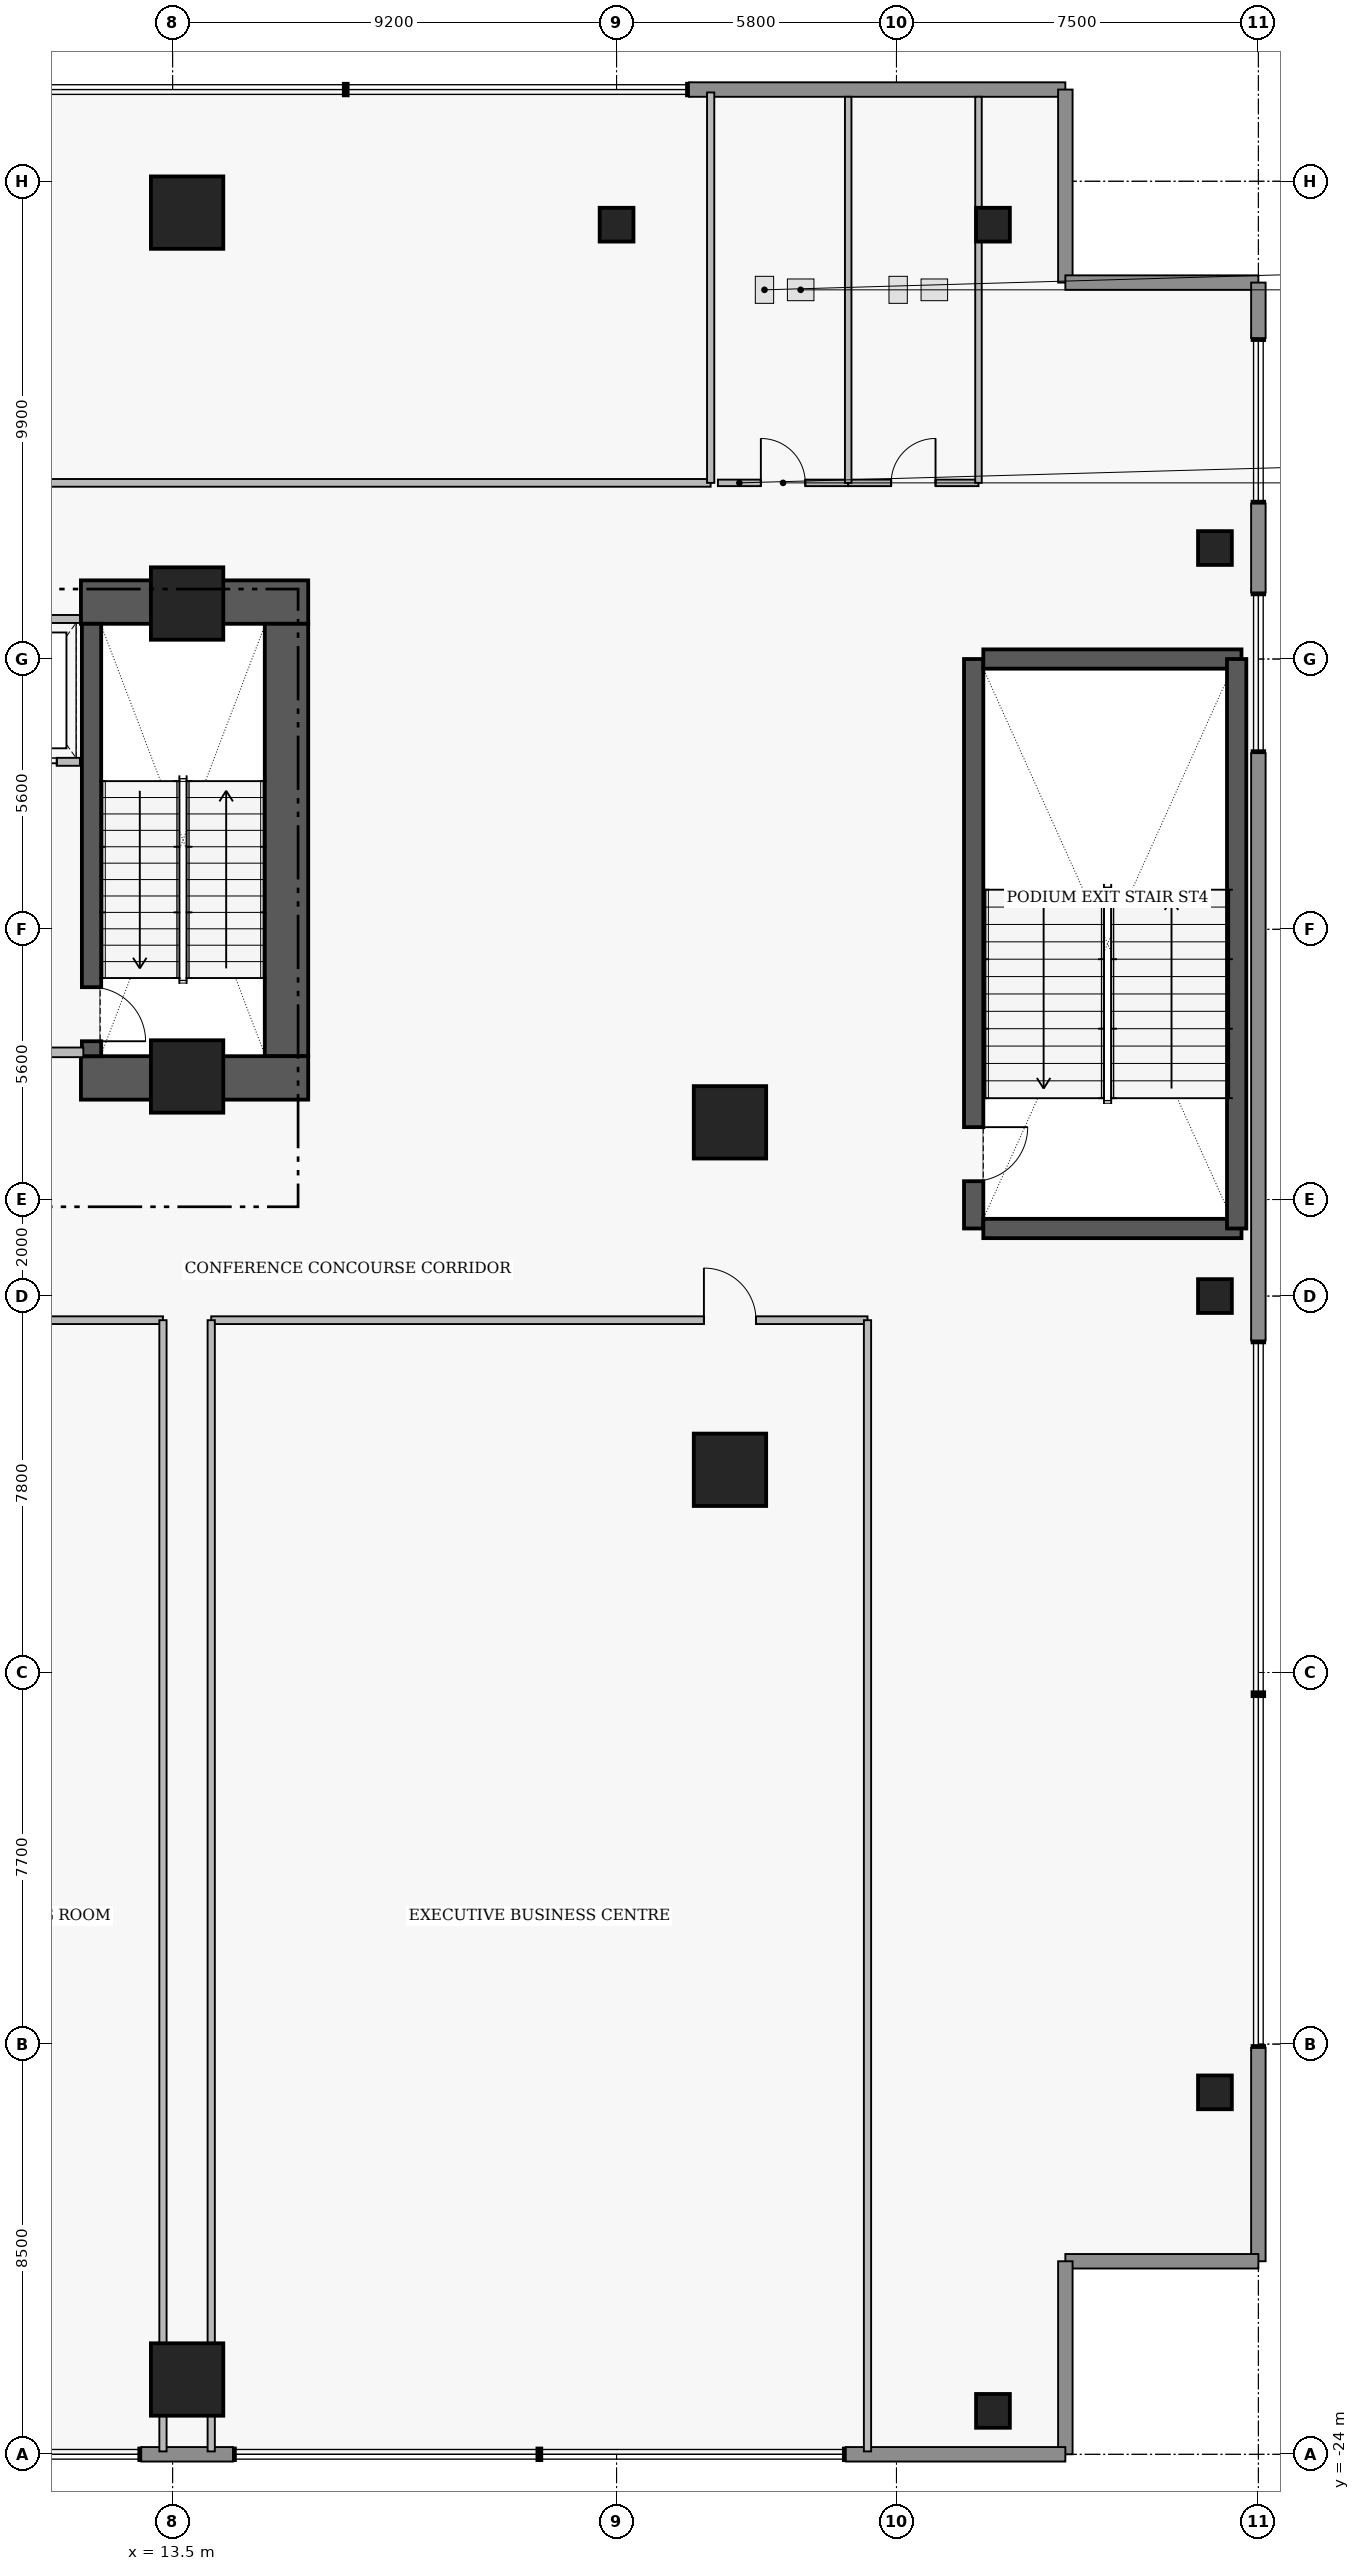
"""IFC4 building model, lengths in metres.
Left out: names, types, materials, properties, quantities, classifications, styles, units other than length and angle.
Written with IfcOpenShell. Run it as: python <this file> out.ifc"""

import sys

from ifc_helpers import new_model, si_unit, direction, frame, frame_2d, origin, origin_2d, place, context, subcontext, project, spatial, rectangle, extrude, element, fill, save


model = new_model("IFC4")
c1 = context("Model", 3, precision=1e-05, world=origin(), true_north=direction((0.0, 1.0)))
c2 = subcontext(c1, "Body", "Model", "MODEL_VIEW")
j1 = project(units=[si_unit("LENGTHUNIT", "METRE"), si_unit("PLANEANGLEUNIT", "RADIAN")], contexts=[c1])
p1 = place(None, origin())
s1 = spatial("IfcSite", under=j1, at=p1, CompositionType="ELEMENT")
p2 = place(p1, origin())
s2 = spatial("IfcBuilding", under=s1, at=p2, CompositionType="ELEMENT")
p3 = place(p2, frame((0.0, 0.0, 18.0)))
s3 = spatial("IfcBuildingStorey", under=s2, at=p3, CompositionType="ELEMENT", Elevation=18.0)
p4 = place(p3, frame((11.6, 14.38, 0.0), z_axis=(0.0, 0.0, 1.0), x_axis=(1.0, 0.0, 0.0)))
e1 = element("IfcWall", 1, at=p4, inside=s3, PredefinedType="SHEAR", context=c2, shape_type="SweptSolid", body=[
    extrude(rectangle(XDim=4.71, YDim=0.9, at=frame_2d((2.355, 0.0))), origin(), (0.0, 0.0, 1.0), 4.61),
])
p5 = place(p3, frame((15.86, 4.97, 0.0), z_axis=(0.0, 0.0, 1.0), x_axis=(0.0, 1.0, 0.0)))
e2 = element("IfcWall", 2, at=p5, inside=s3, PredefinedType="SHEAR", context=c2, shape_type="SweptSolid", body=[
    extrude(rectangle(XDim=8.96, YDim=0.9, at=frame_2d((4.48, 0.0))), origin(), (0.0, 0.0, 1.0), 4.61),
])
p6 = place(p3, frame((11.6, 4.52, 0.0), z_axis=(0.0, 0.0, 1.0), x_axis=(1.0, 0.0, 0.0)))
e3 = element("IfcWall", 3, at=p6, inside=s3, PredefinedType="SHEAR", context=c2, shape_type="SweptSolid", body=[
    extrude(rectangle(XDim=4.71, YDim=0.9, at=frame_2d((2.355, 0.0))), origin(), (0.0, 0.0, 1.0), 4.61),
])
p7 = place(p3, frame((11.82, 13.93, 0.0), z_axis=(0.0, 0.0, 1.0), x_axis=(0.0, -1.0, 0.0)))
e4 = element("IfcWall", 4, at=p7, inside=s3, PredefinedType="SHEAR", context=c2, shape_type="SweptSolid", body=[
    extrude(rectangle(XDim=8.96, YDim=0.4, at=frame_2d((4.48, 0.0))), origin(), (0.0, 0.0, 1.0), 4.61),
])
p8 = place(p7, frame((7.53, 0.0, 0.0)))
e5 = element("IfcOpeningElement", 5, at=p8, cuts=e4, PredefinedType="OPENING", context=c2, shape_type="SweptSolid", body=[
    extrude(rectangle(XDim=1.12, YDim=2.22, at=frame_2d((0.56, 1.11))), frame((0.0, 0.21, 0.0), z_axis=(0.0, -1.0, 0.0), x_axis=(1.0, 0.0, 0.0)), (0.0, 0.0, 1.0), 0.42),
])
p9 = place(p3, frame((30.1, 13.2, 0.0), z_axis=(0.0, 0.0, 1.0), x_axis=(0.0, -1.0, 0.0)))
e6 = element("IfcWall", 6, at=p9, inside=s3, PredefinedType="SHEAR", context=c2, shape_type="SweptSolid", body=[
    extrude(rectangle(XDim=11.8, YDim=0.4, at=frame_2d((5.9, 0.0))), origin(), (0.0, 0.0, 1.0), 4.61),
])
p10 = place(p9, frame((9.7, 0.0, 0.0)))
e7 = element("IfcOpeningElement", 7, at=p10, cuts=e6, PredefinedType="OPENING", context=c2, shape_type="SweptSolid", body=[
    extrude(rectangle(XDim=1.12, YDim=2.22, at=frame_2d((0.56, 1.11))), frame((0.0, 0.21, 0.0), z_axis=(0.0, -1.0, 0.0), x_axis=(1.0, 0.0, 0.0)), (0.0, 0.0, 1.0), 0.42),
])
for number, where, z_axis, x_axis in (
    (8, (30.3, 1.4, 0.0), (0.0, 0.0, 1.0), (1.0, 0.0, 0.0)),
    (9, (30.3, 13.2, 0.0), (0.0, 0.0, 1.0), (1.0, 0.0, 0.0)),
):
    element("IfcWall", number, at=place(p3, frame(where, z_axis=z_axis, x_axis=x_axis)), inside=s3, PredefinedType="SHEAR", context=c2, shape_type="SweptSolid", body=[
        extrude(rectangle(XDim=5.35, YDim=0.4, at=frame_2d((2.675, 0.0))), origin(), (0.0, 0.0, 1.0), 4.61),
    ])
p11 = place(p3, frame((35.55, 1.4, 0.0), z_axis=(0.0, 0.0, 1.0), x_axis=(0.0, 1.0, 0.0)))
e10 = element("IfcWall", 10, at=p11, inside=s3, PredefinedType="SHEAR", context=c2, shape_type="SweptSolid", body=[
    extrude(rectangle(XDim=11.8, YDim=0.4, at=frame_2d((5.9, 0.0))), origin(), (0.0, 0.0, 1.0), 4.61),
])
for number, where, z_axis, x_axis in (
    (11, (13.8, 14.35, 0.0), (0.0, 0.0, 1.0), (1.0, 0.0, 0.0)),
    (12, (13.8, 4.55, 0.0), (0.0, 0.0, 1.0), (1.0, 0.0, 0.0)),
    (13, (13.8, -22.45, 0.0), (0.0, 0.0, 1.0), (1.0, 0.0, 0.0)),
    (14, (13.8, 22.45, 0.0), (0.0, 0.0, 1.0), (1.0, 0.0, 0.0)),
    (15, (25.05, -3.6, 0.0), (0.0, 0.0, 1.0), (1.0, 0.0, 0.0)),
    (16, (25.05, 3.6, 0.0), (0.0, 0.0, 1.0), (1.0, 0.0, 0.0)),
):
    element("IfcColumn", number, at=place(p3, frame(where, z_axis=z_axis, x_axis=x_axis)), inside=s3, PredefinedType="COLUMN", context=c2, shape_type="SweptSolid", body=[
        extrude(rectangle(XDim=1.5, YDim=1.5, at=origin_2d()), origin(), (0.0, 0.0, 1.0), 4.8),
    ])
for number, where, z_axis, x_axis in (
    (17, (30.5, -23.1, 0.0), (0.0, 0.0, 1.0), (1.0, 0.0, 0.0)),
    (18, (30.5, 22.2, 0.0), (0.0, 0.0, 1.0), (1.0, 0.0, 0.0)),
    (19, (35.1, -16.5, 0.0), (0.0, 0.0, 1.0), (1.0, 0.0, 0.0)),
    (20, (35.1, 0.0, 0.0), (0.0, 0.0, 1.0), (1.0, 0.0, 0.0)),
    (21, (35.1, 15.5, 0.0), (0.0, 0.0, 1.0), (1.0, 0.0, 0.0)),
    (22, (22.7, 22.2, 0.0), (0.0, 0.0, 1.0), (1.0, 0.0, 0.0)),
):
    element("IfcColumn", number, at=place(p3, frame(where, z_axis=z_axis, x_axis=x_axis)), inside=s3, PredefinedType="COLUMN", context=c2, shape_type="SweptSolid", body=[
        extrude(rectangle(XDim=0.7, YDim=0.7, at=origin_2d()), origin(), (0.0, 0.0, 1.0), 4.8),
    ])
p12 = place(p3, frame((24.2, 25.0, 0.0), z_axis=(0.0, 0.0, 1.0), x_axis=(1.0, 0.0, 0.0)))
e23 = element("IfcWall", 23, at=p12, inside=s3, PredefinedType="STANDARD", context=c2, shape_type="SweptSolid", body=[
    extrude(rectangle(XDim=7.8, YDim=0.3, at=frame_2d((3.9, 0.0))), origin(), (0.0, 0.0, 1.0), 4.54),
])
for number, where, z_axis, x_axis in (
    (24, (32.0, 25.0, 0.0), (0.0, 0.0, 1.0), (0.0, -1.0, 0.0)),
    (25, (32.0, 21.0, 0.0), (0.0, 0.0, 1.0), (1.0, 0.0, 0.0)),
):
    element("IfcWall", number, at=place(p3, frame(where, z_axis=z_axis, x_axis=x_axis)), inside=s3, PredefinedType="STANDARD", context=c2, shape_type="SweptSolid", body=[
        extrude(rectangle(XDim=4.0, YDim=0.3, at=frame_2d((2.0, 0.0))), origin(), (0.0, 0.0, 1.0), 4.54),
    ])
p13 = place(p3, frame((36.0, 21.0, 0.0), z_axis=(0.0, 0.0, 1.0), x_axis=(0.0, -1.0, 0.0)))
e26 = element("IfcWall", 26, at=p13, inside=s3, PredefinedType="STANDARD", context=c2, shape_type="SweptSolid", body=[
    extrude(rectangle(XDim=1.15, YDim=0.3, at=frame_2d((0.575, 0.0))), origin(), (0.0, 0.0, 1.0), 4.54),
])
p14 = place(p3, frame((36.0, 16.42, 0.0), z_axis=(0.0, 0.0, 1.0), x_axis=(0.0, -1.0, 0.0)))
e27 = element("IfcWall", 27, at=p14, inside=s3, PredefinedType="STANDARD", context=c2, shape_type="SweptSolid", body=[
    extrude(rectangle(XDim=1.84, YDim=0.3, at=frame_2d((0.92, 0.0))), origin(), (0.0, 0.0, 1.0), 4.54),
])
p15 = place(p3, frame((36.0, 11.25, 0.0), z_axis=(0.0, 0.0, 1.0), x_axis=(0.0, -1.0, 0.0)))
e28 = element("IfcWall", 28, at=p15, inside=s3, PredefinedType="STANDARD", context=c2, shape_type="SweptSolid", body=[
    extrude(rectangle(XDim=12.17, YDim=0.3, at=frame_2d((6.085, 0.0))), origin(), (0.0, 0.0, 1.0), 4.54),
])
p16 = place(p3, frame((36.0, -15.58, 0.0), z_axis=(0.0, 0.0, 1.0), x_axis=(0.0, -1.0, 0.0)))
e29 = element("IfcWall", 29, at=p16, inside=s3, PredefinedType="STANDARD", context=c2, shape_type="SweptSolid", body=[
    extrude(rectangle(XDim=4.42, YDim=0.3, at=frame_2d((2.21, 0.0))), origin(), (0.0, 0.0, 1.0), 4.54),
])
for number, where, z_axis, x_axis in (
    (30, (36.0, -20.0, 0.0), (0.0, 0.0, 1.0), (-1.0, 0.0, 0.0)),
    (31, (32.0, -20.0, 0.0), (0.0, 0.0, 1.0), (0.0, -1.0, 0.0)),
):
    element("IfcWall", number, at=place(p3, frame(where, z_axis=z_axis, x_axis=x_axis)), inside=s3, PredefinedType="STANDARD", context=c2, shape_type="SweptSolid", body=[
        extrude(rectangle(XDim=4.0, YDim=0.3, at=frame_2d((2.0, 0.0))), origin(), (0.0, 0.0, 1.0), 4.54),
    ])
p17 = place(p3, frame((32.0, -24.0, 0.0), z_axis=(0.0, 0.0, 1.0), x_axis=(-1.0, 0.0, 0.0)))
e32 = element("IfcWall", 32, at=p17, inside=s3, PredefinedType="STANDARD", context=c2, shape_type="SweptSolid", body=[
    extrude(rectangle(XDim=4.55, YDim=0.3, at=frame_2d((2.275, 0.0))), origin(), (0.0, 0.0, 1.0), 4.54),
])
p18 = place(p3, frame((14.75, -24.0, 0.0), z_axis=(0.0, 0.0, 1.0), x_axis=(-1.0, 0.0, 0.0)))
e33 = element("IfcWall", 33, at=p18, inside=s3, PredefinedType="STANDARD", context=c2, shape_type="SweptSolid", body=[
    extrude(rectangle(XDim=1.9, YDim=0.3, at=frame_2d((0.95, 0.0))), origin(), (0.0, 0.0, 1.0), 4.54),
])
p19 = place(p3, frame((9.42, 11.07, 0.0), z_axis=(0.0, 0.0, 1.0), x_axis=(1.0, 0.0, 0.0)))
e34 = element("IfcWall", 34, at=p19, inside=s3, PredefinedType="PARTITIONING", context=c2, shape_type="SweptSolid", body=[
    extrude(rectangle(XDim=2.16, YDim=0.165, at=frame_2d((1.08, 0.0))), origin(), (0.0, 0.0, 1.0), 4.54),
])
p20 = place(p19, frame((0.53, 0.0, 0.0)))
e35 = element("IfcOpeningElement", 35, at=p20, cuts=e34, PredefinedType="OPENING", context=c2, shape_type="SweptSolid", body=[
    extrude(rectangle(XDim=1.15, YDim=2.25, at=frame_2d((0.575, 1.125))), frame((0.0, 0.093, 0.0), z_axis=(0.0, -1.0, 0.0), x_axis=(1.0, 0.0, 0.0)), (0.0, 0.0, 1.0), 0.185),
])
p21 = place(p3, frame((5.1, -0.5, 0.0), z_axis=(0.0, 0.0, 1.0), x_axis=(1.0, 0.0, 0.0)))
e36 = element("IfcWall", 36, at=p21, inside=s3, PredefinedType="PARTITIONING", context=c2, shape_type="SweptSolid", body=[
    extrude(rectangle(XDim=8.2, YDim=0.16, at=frame_2d((4.1, 0.0))), origin(), (0.0, 0.0, 1.0), 4.54),
])
p22 = place(p21, frame((3.56, 0.0, 0.0)))
e37 = element("IfcOpeningElement", 37, at=p22, cuts=e36, PredefinedType="OPENING", context=c2, shape_type="SweptSolid", body=[
    extrude(rectangle(XDim=1.08, YDim=2.18, at=frame_2d((0.54, 1.09))), frame((0.0, 0.09, 0.0), z_axis=(0.0, -1.0, 0.0), x_axis=(1.0, 0.0, 0.0)), (0.0, 0.0, 1.0), 0.18),
])
p23 = place(p3, frame((14.3, -0.5, 0.0), z_axis=(0.0, 0.0, 1.0), x_axis=(1.0, 0.0, 0.0)))
e38 = element("IfcWall", 38, at=p23, inside=s3, PredefinedType="PARTITIONING", context=c2, shape_type="SweptSolid", body=[
    extrude(rectangle(XDim=13.6, YDim=0.16, at=frame_2d((6.8, 0.0))), origin(), (0.0, 0.0, 1.0), 4.54),
])
p24 = place(p23, frame((10.21, 0.0, 0.0)))
e39 = element("IfcOpeningElement", 39, at=p24, cuts=e38, PredefinedType="OPENING", context=c2, shape_type="SweptSolid", body=[
    extrude(rectangle(XDim=1.08, YDim=2.18, at=frame_2d((0.54, 1.09))), frame((0.0, 0.09, 0.0), z_axis=(0.0, -1.0, 0.0), x_axis=(1.0, 0.0, 0.0)), (0.0, 0.0, 1.0), 0.18),
])
p25 = place(p3, frame((-27.9, 16.85, 0.0), z_axis=(0.0, 0.0, 1.0), x_axis=(1.0, 0.0, 0.0)))
e40 = element("IfcWall", 40, at=p25, inside=s3, PredefinedType="PARTITIONING", context=c2, shape_type="SweptSolid", body=[
    extrude(rectangle(XDim=52.55, YDim=0.16, at=frame_2d((26.275, 0.0))), origin(), (0.0, 0.0, 1.0), 4.007),
])
p26 = place(p25, frame((25.735, 0.0, 0.0)))
e41 = element("IfcOpeningElement", 41, at=p26, cuts=e40, PredefinedType="OPENING", context=c2, shape_type="SweptSolid", body=[
    extrude(rectangle(XDim=1.08, YDim=2.18, at=frame_2d((0.54, 1.09))), frame((0.0, 0.09, 0.0), z_axis=(0.0, -1.0, 0.0), x_axis=(1.0, 0.0, 0.0)), (0.0, 0.0, 1.0), 0.18),
])
p27 = place(p3, frame((24.8, 16.85, 0.0), z_axis=(0.0, 0.0, 1.0), x_axis=(1.0, 0.0, 0.0)))
e42 = element("IfcWall", 42, at=p27, inside=s3, PredefinedType="PLUMBINGWALL", context=c2, shape_type="SweptSolid", body=[
    extrude(rectangle(XDim=2.7, YDim=0.135, at=frame_2d((1.35, 0.0))), origin(), (0.0, 0.0, 1.0), 4.54),
])
p28 = place(p27, frame((0.89, 0.0, 0.0)))
e43 = element("IfcOpeningElement", 43, at=p28, cuts=e42, PredefinedType="OPENING", context=c2, shape_type="SweptSolid", body=[
    extrude(rectangle(XDim=0.92, YDim=2.12, at=frame_2d((0.46, 1.06))), frame((0.0, 0.077, 0.0), z_axis=(0.0, -1.0, 0.0), x_axis=(1.0, 0.0, 0.0)), (0.0, 0.0, 1.0), 0.155),
])
p29 = place(p3, frame((27.5, 16.85, 0.0), z_axis=(0.0, 0.0, 1.0), x_axis=(1.0, 0.0, 0.0)))
e44 = element("IfcWall", 44, at=p29, inside=s3, PredefinedType="PLUMBINGWALL", context=c2, shape_type="SweptSolid", body=[
    extrude(rectangle(XDim=2.7, YDim=0.135, at=frame_2d((1.35, 0.0))), origin(), (0.0, 0.0, 1.0), 4.54),
])
p30 = place(p29, frame((0.89, 0.0, 0.0)))
e45 = element("IfcOpeningElement", 45, at=p30, cuts=e44, PredefinedType="OPENING", context=c2, shape_type="SweptSolid", body=[
    extrude(rectangle(XDim=0.92, YDim=2.12, at=frame_2d((0.46, 1.06))), frame((0.0, 0.077, 0.0), z_axis=(0.0, -1.0, 0.0), x_axis=(1.0, 0.0, 0.0)), (0.0, 0.0, 1.0), 0.155),
])
p31 = place(p3, frame((8.8, 5.05, 0.0), z_axis=(0.0, 0.0, 1.0), x_axis=(1.0, 0.0, 0.0)))
e46 = element("IfcWall", 46, at=p31, inside=s3, PredefinedType="PARTITIONING", context=c2, shape_type="SweptSolid", body=[
    extrude(rectangle(XDim=2.85, YDim=0.2, at=frame_2d((1.425, 0.0))), origin(), (0.0, 0.0, 1.0), 4.54),
])
p32 = place(p3, frame((9.42, 14.03, 0.0), z_axis=(0.0, 0.0, 1.0), x_axis=(1.0, 0.0, 0.0)))
e47 = element("IfcWall", 47, at=p32, inside=s3, PredefinedType="PARTITIONING", context=c2, shape_type="SweptSolid", body=[
    extrude(rectangle(XDim=2.16, YDim=0.165, at=frame_2d((1.08, 0.0))), origin(), (0.0, 0.0, 1.0), 4.54),
])
for number, where, z_axis, x_axis in (
    (48, (13.3, -23.94, 0.0), (0.0, 0.0, 1.0), (0.0, 1.0, 0.0)),
    (49, (14.3, -23.94, 0.0), (0.0, 0.0, 1.0), (0.0, 1.0, 0.0)),
    (50, (27.9, -23.94, 0.0), (0.0, 0.0, 1.0), (0.0, 1.0, 0.0)),
):
    element("IfcWall", number, at=place(p3, frame(where, z_axis=z_axis, x_axis=x_axis)), inside=s3, PredefinedType="PARTITIONING", context=c2, shape_type="SweptSolid", body=[
        extrude(rectangle(XDim=23.44, YDim=0.15, at=frame_2d((11.72, 0.0))), origin(), (0.0, 0.0, 1.0), 4.54),
    ])
p33 = place(p3, frame((24.65, 16.85, 0.0), z_axis=(0.0, 0.0, 1.0), x_axis=(0.0, 1.0, 0.0)))
e51 = element("IfcWall", 51, at=p33, inside=s3, PredefinedType="PARTITIONING", context=c2, shape_type="SweptSolid", body=[
    extrude(rectangle(XDim=8.09, YDim=0.15, at=frame_2d((4.045, 0.0))), origin(), (0.0, 0.0, 1.0), 4.54),
])
for number, where, z_axis, x_axis in (
    (52, (30.2, 16.85, 0.0), (0.0, 0.0, 1.0), (0.0, 1.0, 0.0)),
    (53, (27.5, 16.85, 0.0), (0.0, 0.0, 1.0), (0.0, 1.0, 0.0)),
):
    element("IfcWall", number, at=place(p3, frame(where, z_axis=z_axis, x_axis=x_axis)), inside=s3, PredefinedType="PLUMBINGWALL", context=c2, shape_type="SweptSolid", body=[
        extrude(rectangle(XDim=8.0, YDim=0.135, at=frame_2d((4.0, 0.0))), origin(), (0.0, 0.0, 1.0), 4.54),
    ])
p34 = place(p8, origin())
e54 = element("IfcDoor", 54, at=p34, inside=s3, OperationType="SINGLE_SWING_RIGHT", PredefinedType="DOOR", context=c2, shape_type="SweptSolid", body=[
    extrude(rectangle(XDim=1.12, YDim=2.22, at=frame_2d((0.56, 1.11))), frame((0.0, 0.025, 0.0), z_axis=(0.0, -1.0, 0.0), x_axis=(1.0, 0.0, 0.0)), (0.0, 0.0, 1.0), 0.05),
])
fill(e5, e54)
p35 = place(p10, origin())
e55 = element("IfcDoor", 55, at=p35, inside=s3, OperationType="SINGLE_SWING_LEFT", PredefinedType="DOOR", context=c2, shape_type="SweptSolid", body=[
    extrude(rectangle(XDim=1.12, YDim=2.22, at=frame_2d((0.56, 1.11))), frame((0.0, 0.025, 0.0), z_axis=(0.0, -1.0, 0.0), x_axis=(1.0, 0.0, 0.0)), (0.0, 0.0, 1.0), 0.05),
])
fill(e7, e55)
p36 = place(p20, origin())
e56 = element("IfcDoor", 56, at=p36, inside=s3, OperationType="SLIDING_TO_LEFT", PredefinedType="DOOR", context=c2, shape_type="SweptSolid", body=[
    extrude(rectangle(XDim=1.15, YDim=2.25, at=frame_2d((0.575, 1.125))), frame((0.0, 0.025, 0.0), z_axis=(0.0, -1.0, 0.0), x_axis=(1.0, 0.0, 0.0)), (0.0, 0.0, 1.0), 0.05),
])
fill(e35, e56)
p37 = place(p24, origin())
e57 = element("IfcDoor", 57, at=p37, inside=s3, OperationType="SINGLE_SWING_LEFT", PredefinedType="DOOR", context=c2, shape_type="SweptSolid", body=[
    extrude(rectangle(XDim=1.08, YDim=2.18, at=frame_2d((0.54, 1.09))), frame((0.0, 0.025, 0.0), z_axis=(0.0, -1.0, 0.0), x_axis=(1.0, 0.0, 0.0)), (0.0, 0.0, 1.0), 0.05),
])
fill(e39, e57)
p38 = place(p28, origin())
e58 = element("IfcDoor", 58, at=p38, inside=s3, OperationType="SINGLE_SWING_LEFT", PredefinedType="DOOR", context=c2, shape_type="SweptSolid", body=[
    extrude(rectangle(XDim=0.92, YDim=2.12, at=frame_2d((0.46, 1.06))), frame((0.0, 0.025, 0.0), z_axis=(0.0, -1.0, 0.0), x_axis=(1.0, 0.0, 0.0)), (0.0, 0.0, 1.0), 0.05),
])
fill(e43, e58)
p39 = place(p30, origin())
e59 = element("IfcDoor", 59, at=p39, inside=s3, OperationType="SINGLE_SWING_RIGHT", PredefinedType="DOOR", context=c2, shape_type="SweptSolid", body=[
    extrude(rectangle(XDim=0.92, YDim=2.12, at=frame_2d((0.46, 1.06))), frame((0.0, 0.025, 0.0), z_axis=(0.0, -1.0, 0.0), x_axis=(1.0, 0.0, 0.0)), (0.0, 0.0, 1.0), 0.05),
])
fill(e45, e59)
save(model, sys.argv[1])
